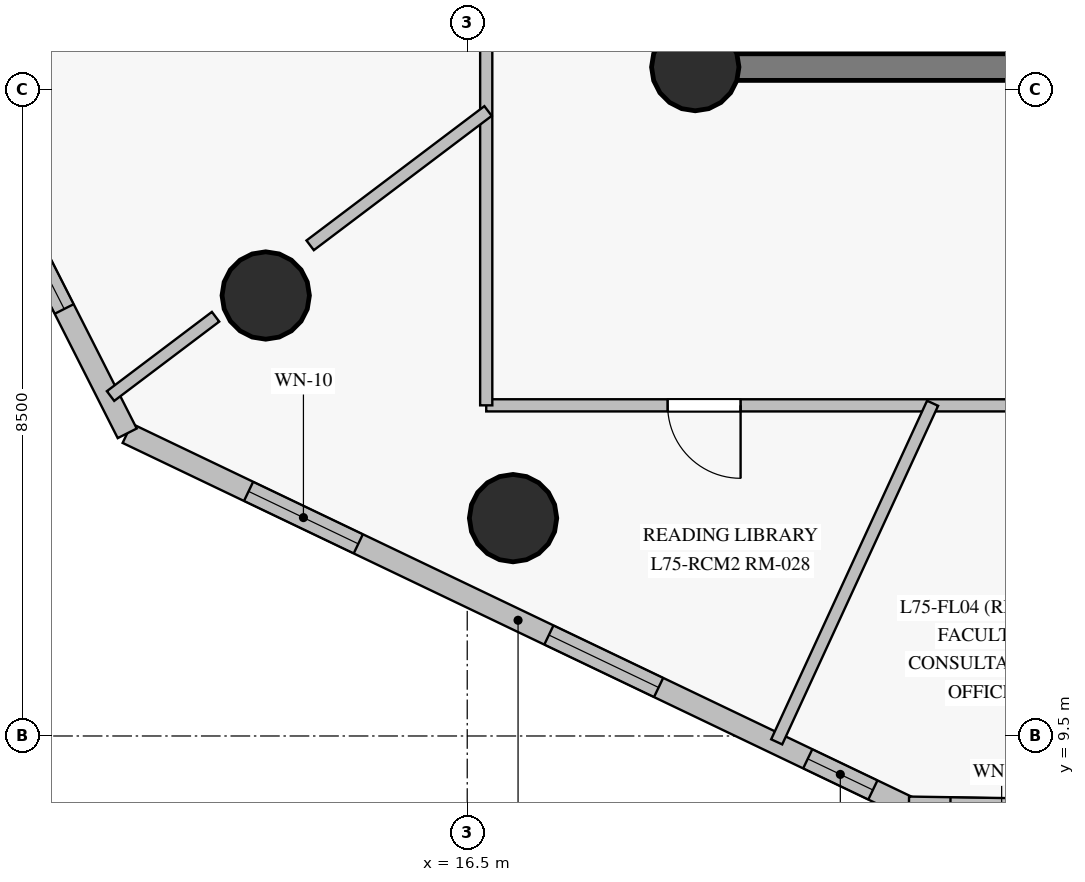
"""IFC4 building model, lengths in metres.
Left out: names, types, materials, properties, quantities, classifications, styles, units other than length and angle.
Written with IfcOpenShell. Run it as: python <this file> out.ifc"""

import sys

from ifc_helpers import new_model, si_unit, direction, frame, frame_2d, origin, origin_with_axes, origin_2d, place, context, subcontext, project, spatial, rectangle, circle, extrude, source, transform, mapped, element, fill, save


model = new_model("IFC4")
c1 = context("Model", 3, precision=1e-05, world=origin(), true_north=direction((0.0, 1.0)))
c2 = subcontext(c1, "Body", "Model", "MODEL_VIEW")
j1 = project(units=[si_unit("LENGTHUNIT", "METRE"), si_unit("PLANEANGLEUNIT", "RADIAN")], contexts=[c1])
p1 = place(None, origin())
s1 = spatial("IfcSite", under=j1, at=p1, CompositionType="ELEMENT")
p2 = place(p1, origin())
s2 = spatial("IfcBuilding", under=s1, at=p2, CompositionType="ELEMENT")
p3 = place(p2, frame((0.0, 0.0, 253.5)))
s3 = spatial("IfcBuildingStorey", under=s2, at=p3, CompositionType="ELEMENT", Elevation=253.5)
p4 = place(p3, frame((19.5, 18.3, 0.0), z_axis=(0.0, 0.0, 1.0), x_axis=(1.0, 0.0, 0.0)))
e1 = element("IfcWall", 1, at=p4, inside=s3, PredefinedType="SHEAR", context=c2, shape_type="SweptSolid", body=[
    extrude(rectangle(XDim=7.05, YDim=0.35, at=frame_2d((3.525, 0.0))), origin(), (0.0, 0.0, 1.0), 2.85),
])
p5 = place(p4, frame((4.2, 0.0, 0.0)))
e2 = element("IfcOpeningElement", 2, at=p5, cuts=e1, PredefinedType="OPENING", context=c2, shape_type="SweptSolid", body=[
    extrude(rectangle(XDim=1.4, YDim=2.2, at=frame_2d((0.7, 1.1))), frame((0.0, 0.185, 0.0), z_axis=(0.0, -1.0, 0.0), x_axis=(1.0, 0.0, 0.0)), (0.0, 0.0, 1.0), 0.37),
])
p6 = place(p3, frame((19.5, 34.7, 0.0), z_axis=(0.0, 0.0, 1.0), x_axis=(0.0, -1.0, 0.0)))
e3 = element("IfcWall", 3, at=p6, inside=s3, PredefinedType="SHEAR", context=c2, shape_type="SweptSolid", body=[
    extrude(rectangle(XDim=16.4, YDim=0.35, at=frame_2d((8.2, 0.0))), origin(), (0.0, 0.0, 1.0), 2.85),
])
p7 = place(p6, frame((3.24, 0.0, 0.0)))
e4 = element("IfcOpeningElement", 4, at=p7, cuts=e3, PredefinedType="OPENING", context=c2, shape_type="SweptSolid", body=[
    extrude(rectangle(XDim=1.1, YDim=2.15, at=frame_2d((0.55, 1.075))), frame((0.0, 0.185, 0.0), z_axis=(0.0, -1.0, 0.0), x_axis=(1.0, 0.0, 0.0)), (0.0, 0.0, 1.0), 0.37),
])
m1 = source(origin_with_axes(), c2, "Body", "SweptSolid", [
    extrude(circle(Radius=0.575, at=origin_2d()), origin(), (0.0, 0.0, 1.0), 3.05),
])
for number, where, z_axis, x_axis in (
    (5, (19.5, 18.3, 0.0), (0.0, 0.0, 1.0), (1.0, 0.0, 0.0)),
    (6, (13.849, 15.295, 0.0), (0.0, 0.0, 1.0), (1.0, 0.0, 0.0)),
    (7, (17.103, 12.366, 0.0), (0.0, 0.0, 1.0), (1.0, 0.0, 0.0)),
):
    element("IfcColumn", number, at=place(p3, frame(where, z_axis=z_axis, x_axis=x_axis)), inside=s3, PredefinedType="COLUMN", context=c2, shape_type="MappedRepresentation", body=[
        mapped(m1, transform((0.0, 0.0, 0.0), scale=1.0)),
    ])
p8 = place(p3, frame((12.027, 13.482, 0.0), z_axis=(0.0, 0.0, 1.0), x_axis=(0.902132409452, -0.431459286395, 0.0)))
e8 = element("IfcWall", 8, at=p8, inside=s3, PredefinedType="SOLIDWALL", context=c2, shape_type="SweptSolid", body=[
    extrude(rectangle(XDim=11.4, YDim=0.28, at=frame_2d((5.7, 0.0))), origin(), (0.0, 0.0, 1.0), 2.85),
])
p9 = place(p8, frame((1.77, 0.0, 0.85)))
e9 = element("IfcOpeningElement", 9, at=p9, cuts=e8, PredefinedType="OPENING", context=c2, shape_type="SweptSolid", body=[
    extrude(rectangle(XDim=1.6, YDim=1.6, at=frame_2d((0.8, 0.8))), frame((0.0, 0.15, 0.0), z_axis=(0.0, -1.0, 0.0), x_axis=(1.0, 0.0, 0.0)), (0.0, 0.0, 1.0), 0.3),
])
p10 = place(p8, frame((6.149, 0.0, 0.85)))
e10 = element("IfcOpeningElement", 10, at=p10, cuts=e8, PredefinedType="OPENING", context=c2, shape_type="SweptSolid", body=[
    extrude(rectangle(XDim=1.6, YDim=1.6, at=frame_2d((0.8, 0.8))), frame((0.0, 0.15, 0.0), z_axis=(0.0, -1.0, 0.0), x_axis=(1.0, 0.0, 0.0)), (0.0, 0.0, 1.0), 0.3),
])
p11 = place(p8, frame((9.924, 0.0, 0.85)))
e11 = element("IfcOpeningElement", 11, at=p11, cuts=e8, PredefinedType="OPENING", context=c2, shape_type="SweptSolid", body=[
    extrude(rectangle(XDim=0.95, YDim=1.5, at=frame_2d((0.475, 0.75))), frame((0.0, 0.15, 0.0), z_axis=(0.0, -1.0, 0.0), x_axis=(1.0, 0.0, 0.0)), (0.0, 0.0, 1.0), 0.3),
])
p12 = place(p3, frame((22.311, 8.563, 0.0), z_axis=(0.0, 0.0, 1.0), x_axis=(0.999875294772, -0.015792241896, 0.0)))
e12 = element("IfcWall", 12, at=p12, inside=s3, PredefinedType="SOLIDWALL", context=c2, shape_type="SweptSolid", body=[
    extrude(rectangle(XDim=8.951, YDim=0.28, at=frame_2d((4.476, 0.0))), origin(), (0.0, 0.0, 1.0), 2.85),
])
p13 = place(p12, frame((0.545, 0.0, 0.85)))
e13 = element("IfcOpeningElement", 13, at=p13, cuts=e12, PredefinedType="OPENING", context=c2, shape_type="SweptSolid", body=[
    extrude(rectangle(XDim=1.35, YDim=1.6, at=frame_2d((0.675, 0.8))), frame((0.0, 0.15, 0.0), z_axis=(0.0, -1.0, 0.0), x_axis=(1.0, 0.0, 0.0)), (0.0, 0.0, 1.0), 0.3),
])
p14 = place(p12, frame((4.836, 0.0, 0.85)))
e14 = element("IfcOpeningElement", 14, at=p14, cuts=e12, PredefinedType="OPENING", context=c2, shape_type="SweptSolid", body=[
    extrude(rectangle(XDim=1.6, YDim=1.6, at=frame_2d((0.8, 0.8))), frame((0.0, 0.15, 0.0), z_axis=(0.0, -1.0, 0.0), x_axis=(1.0, 0.0, 0.0)), (0.0, 0.0, 1.0), 0.3),
])
p15 = place(p3, frame((8.262, 20.909, 0.0), z_axis=(0.0, 0.0, 1.0), x_axis=(0.452132129268, -0.891950972691, 0.0)))
e15 = element("IfcWall", 15, at=p15, inside=s3, PredefinedType="SOLIDWALL", context=c2, shape_type="SweptSolid", body=[
    extrude(rectangle(XDim=8.327, YDim=0.28, at=frame_2d((4.164, 0.0))), origin(), (0.0, 0.0, 1.0), 2.85),
])
p16 = place(p15, frame((1.351, 0.0, 0.85)))
e16 = element("IfcOpeningElement", 16, at=p16, cuts=e15, PredefinedType="OPENING", context=c2, shape_type="SweptSolid", body=[
    extrude(rectangle(XDim=1.6, YDim=1.6, at=frame_2d((0.8, 0.8))), frame((0.0, 0.15, 0.0), z_axis=(0.0, -1.0, 0.0), x_axis=(1.0, 0.0, 0.0)), (0.0, 0.0, 1.0), 0.3),
])
p17 = place(p15, frame((4.893, 0.0, 0.85)))
e17 = element("IfcOpeningElement", 17, at=p17, cuts=e15, PredefinedType="OPENING", context=c2, shape_type="SweptSolid", body=[
    extrude(rectangle(XDim=1.6, YDim=1.6, at=frame_2d((0.8, 0.8))), frame((0.0, 0.15, 0.0), z_axis=(0.0, -1.0, 0.0), x_axis=(1.0, 0.0, 0.0)), (0.0, 0.0, 1.0), 0.3),
])
p18 = place(p3, frame((41.8, 13.85, 0.0), z_axis=(0.0, 0.0, 1.0), x_axis=(-1.0, 0.0, 0.0)))
e18 = element("IfcWall", 18, at=p18, inside=s3, PredefinedType="PARTITIONING", context=c2, shape_type="SweptSolid", body=[
    extrude(rectangle(XDim=25.05, YDim=0.16, at=frame_2d((12.525, 0.0))), origin(), (0.0, 0.0, 1.0), 2.3),
])
p19 = place(p18, frame((21.704, 0.0, 0.0)))
e19 = element("IfcOpeningElement", 19, at=p19, cuts=e18, PredefinedType="OPENING", context=c2, shape_type="SweptSolid", body=[
    extrude(rectangle(XDim=0.96, YDim=2.15, at=frame_2d((0.48, 1.075))), frame((0.0, 0.09, 0.0), z_axis=(0.0, -1.0, 0.0), x_axis=(1.0, 0.0, 0.0)), (0.0, 0.0, 1.0), 0.18),
])
p20 = place(p18, frame((16.298, 0.0, 0.0)))
e20 = element("IfcOpeningElement", 20, at=p20, cuts=e18, PredefinedType="OPENING", context=c2, shape_type="SweptSolid", body=[
    extrude(rectangle(XDim=0.96, YDim=2.15, at=frame_2d((0.48, 1.075))), frame((0.0, 0.09, 0.0), z_axis=(0.0, -1.0, 0.0), x_axis=(1.0, 0.0, 0.0)), (0.0, 0.0, 1.0), 0.18),
])
p21 = place(p18, frame((12.05, 0.0, 0.0)))
e21 = element("IfcOpeningElement", 21, at=p21, cuts=e18, PredefinedType="OPENING", context=c2, shape_type="SweptSolid", body=[
    extrude(rectangle(XDim=0.96, YDim=2.15, at=frame_2d((0.48, 1.075))), frame((0.0, 0.09, 0.0), z_axis=(0.0, -1.0, 0.0), x_axis=(1.0, 0.0, 0.0)), (0.0, 0.0, 1.0), 0.18),
])
p22 = place(p18, frame((8.292, 0.0, 0.0)))
e22 = element("IfcOpeningElement", 22, at=p22, cuts=e18, PredefinedType="OPENING", context=c2, shape_type="SweptSolid", body=[
    extrude(rectangle(XDim=0.96, YDim=2.15, at=frame_2d((0.48, 1.075))), frame((0.0, 0.09, 0.0), z_axis=(0.0, -1.0, 0.0), x_axis=(1.0, 0.0, 0.0)), (0.0, 0.0, 1.0), 0.18),
])
p23 = place(p3, frame((16.75, 13.85, 0.0), z_axis=(0.0, 0.0, 1.0), x_axis=(0.0, 1.0, 0.0)))
e23 = element("IfcWall", 23, at=p23, inside=s3, PredefinedType="PARTITIONING", context=c2, shape_type="SweptSolid", body=[
    extrude(rectangle(XDim=17.8, YDim=0.16, at=frame_2d((8.9, 0.0))), origin(), (0.0, 0.0, 1.0), 2.45),
])
p24 = place(p23, frame((11.095, 0.0, 0.0)))
e24 = element("IfcOpeningElement", 24, at=p24, cuts=e23, PredefinedType="OPENING", context=c2, shape_type="SweptSolid", body=[
    extrude(rectangle(XDim=0.96, YDim=2.15, at=frame_2d((0.48, 1.075))), frame((0.0, 0.09, 0.0), z_axis=(0.0, -1.0, 0.0), x_axis=(1.0, 0.0, 0.0)), (0.0, 0.0, 1.0), 0.18),
])
p25 = place(p23, frame((8.425, 0.0, 0.0)))
e25 = element("IfcOpeningElement", 25, at=p25, cuts=e23, PredefinedType="OPENING", context=c2, shape_type="SweptSolid", body=[
    extrude(rectangle(XDim=0.96, YDim=2.15, at=frame_2d((0.48, 1.075))), frame((0.0, 0.09, 0.0), z_axis=(0.0, -1.0, 0.0), x_axis=(1.0, 0.0, 0.0)), (0.0, 0.0, 1.0), 0.18),
])
p26 = place(p23, frame((12.875, 0.0, 0.0)))
e26 = element("IfcOpeningElement", 26, at=p26, cuts=e23, PredefinedType="OPENING", context=c2, shape_type="SweptSolid", body=[
    extrude(rectangle(XDim=0.96, YDim=2.15, at=frame_2d((0.48, 1.075))), frame((0.0, 0.09, 0.0), z_axis=(0.0, -1.0, 0.0), x_axis=(1.0, 0.0, 0.0)), (0.0, 0.0, 1.0), 0.18),
])
p27 = place(p3, frame((22.622, 13.877, 0.0), z_axis=(0.0, 0.0, 1.0), x_axis=(-0.418205552884, -0.908352418138, 0.0)))
e27 = element("IfcWall", 27, at=p27, inside=s3, PredefinedType="PARTITIONING", context=c2, shape_type="SweptSolid", body=[
    extrude(rectangle(XDim=4.904, YDim=0.16, at=frame_2d((2.452, 0.0))), origin(), (0.0, 0.0, 1.0), 2.85),
])
p28 = place(p3, frame((16.774, 17.722, 0.0), z_axis=(0.0, 0.0, 1.0), x_axis=(-0.798087936227, -0.602540991177, 0.0)))
e28 = element("IfcWall", 28, at=p28, inside=s3, PredefinedType="PARTITIONING", context=c2, shape_type="SweptSolid", body=[
    extrude(rectangle(XDim=2.933, YDim=0.16, at=frame_2d((1.466, 0.0))), origin(), (0.0, 0.0, 1.0), 2.35),
])
p29 = place(p3, frame((13.189, 15.015, 0.0), z_axis=(0.0, 0.0, 1.0), x_axis=(-0.798117491575, -0.602501842023, 0.0)))
e29 = element("IfcWall", 29, at=p29, inside=s3, PredefinedType="PARTITIONING", context=c2, shape_type="SweptSolid", body=[
    extrude(rectangle(XDim=1.731, YDim=0.16, at=frame_2d((0.865, 0.0))), origin(), (0.0, 0.0, 1.0), 2.85),
])
m2 = source(origin_with_axes(), c2, "Body", "SweptSolid", [
    extrude(rectangle(XDim=1.6, YDim=1.6, at=frame_2d((0.8, 0.8))), frame((0.0, 0.03, 0.0), z_axis=(0.0, -1.0, 0.0), x_axis=(1.0, 0.0, 0.0)), (0.0, 0.0, 1.0), 0.06),
])
p30 = place(p9, origin())
e30 = element("IfcWindow", 30, at=p30, inside=s3, PartitioningType="SINGLE_PANEL", PredefinedType="WINDOW", context=c2, shape_type="MappedRepresentation", body=[
    mapped(m2, transform((0.0, 0.0, 0.0), scale=1.0)),
])
fill(e9, e30)
p31 = place(p10, origin())
e31 = element("IfcWindow", 31, at=p31, inside=s3, PartitioningType="SINGLE_PANEL", PredefinedType="WINDOW", context=c2, shape_type="MappedRepresentation", body=[
    mapped(m2, transform((0.0, 0.0, 0.0), scale=1.0)),
])
fill(e10, e31)
m3 = source(origin_with_axes(), c2, "Body", "SweptSolid", [
    extrude(rectangle(XDim=0.95, YDim=1.5, at=frame_2d((0.475, 0.75))), frame((0.0, 0.03, 0.0), z_axis=(0.0, -1.0, 0.0), x_axis=(1.0, 0.0, 0.0)), (0.0, 0.0, 1.0), 0.06),
])
p32 = place(p11, origin())
e32 = element("IfcWindow", 32, at=p32, inside=s3, PartitioningType="SINGLE_PANEL", PredefinedType="WINDOW", context=c2, shape_type="MappedRepresentation", body=[
    mapped(m3, transform((0.0, 0.0, 0.0), scale=1.0)),
])
fill(e11, e32)
p33 = place(p17, origin())
e33 = element("IfcWindow", 33, at=p33, inside=s3, PartitioningType="SINGLE_PANEL", PredefinedType="WINDOW", context=c2, shape_type="MappedRepresentation", body=[
    mapped(m2, transform((0.0, 0.0, 0.0), scale=1.0)),
])
fill(e17, e33)
m4 = source(origin_with_axes(), c2, "Body", "SweptSolid", [
    extrude(rectangle(XDim=0.96, YDim=2.15, at=frame_2d((0.48, 1.075))), frame((0.0, 0.025, 0.0), z_axis=(0.0, -1.0, 0.0), x_axis=(1.0, 0.0, 0.0)), (0.0, 0.0, 1.0), 0.05),
])
p34 = place(p19, origin())
e34 = element("IfcDoor", 34, at=p34, inside=s3, OperationType="SINGLE_SWING_LEFT", PredefinedType="DOOR", context=c2, shape_type="MappedRepresentation", body=[
    mapped(m4, transform((0.0, 0.0, 0.0), scale=1.0)),
])
fill(e19, e34)
save(model, sys.argv[1])
